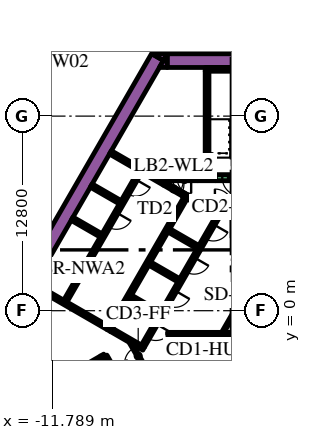
"""IFC4 building model, lengths in metres.
Left out: names, types, materials, properties, quantities, classifications, styles, units other than length and angle.
Written with IfcOpenShell. Run it as: python <this file> out.ifc"""

import sys

from ifc_helpers import new_model, si_unit, direction, frame, frame_2d, origin, place, context, subcontext, project, spatial, polyline, rectangle, outline, extrude, element, fill, save


model = new_model("IFC4")
c1 = context("Model", 3, precision=1e-05, world=origin(), true_north=direction((0.0, 1.0)))
c2 = subcontext(c1, "Body", "Model", "MODEL_VIEW")
j1 = project(units=[si_unit("LENGTHUNIT", "METRE"), si_unit("PLANEANGLEUNIT", "RADIAN")], contexts=[c1])
p1 = place(None, origin())
s1 = spatial("IfcSite", under=j1, at=p1, CompositionType="ELEMENT")
p2 = place(p1, origin())
s2 = spatial("IfcBuilding", under=s1, at=p2, CompositionType="ELEMENT")
p3 = place(p2, frame((0.0, 0.0, 21.6)))
s3 = spatial("IfcBuildingStorey", under=s2, at=p3, CompositionType="ELEMENT", Elevation=21.6)
p4 = place(p3, frame((-15.36, -1.503, 0.0), z_axis=(0.0, 0.0, 1.0), x_axis=(0.50000389221, 0.866023156604, 0.0)))
e1 = element("IfcWall", 1, at=p4, inside=s3, PredefinedType="SOLIDWALL", context=c2, shape_type="SweptSolid", body=[
    extrude(rectangle(XDim=21.0, YDim=0.9, at=frame_2d((10.5, 0.0))), origin(), (0.0, 0.0, 1.0), 6.0),
])
p5 = place(p3, origin())
e2 = element("IfcWall", 2, at=p5, inside=s3, PredefinedType="SOLIDWALL", context=c2, shape_type="SweptSolid", body=[
    extrude(outline(polyline([(-4.215, 16.9), (-4.469, 16.46), (-5.231, 16.9), (-4.215, 16.9)])), origin(), (0.0, 0.0, 1.0), 6.0),
])
p6 = place(p3, frame((-4.224, 16.45, 0.0), z_axis=(0.0, 0.0, 1.0), x_axis=(1.0, 0.0, 0.0)))
e3 = element("IfcWall", 3, at=p6, inside=s3, PredefinedType="SOLIDWALL", context=c2, shape_type="SweptSolid", body=[
    extrude(rectangle(XDim=9.488, YDim=0.9, at=frame_2d((4.744, 0.0))), origin(), (0.0, 0.0, 1.0), 6.0),
])
e4 = element("IfcWall", 4, at=p5, inside=s3, PredefinedType="SOLIDWALL", context=c2, shape_type="SweptSolid", body=[
    extrude(outline(polyline([(-4.734, 16.0), (-4.226, 16.88), (-4.226, 16.0), (-4.734, 16.0)])), origin(), (0.0, 0.0, 1.0), 6.0),
])
p7 = place(p3, frame((-1.725, 15.875, 0.0), z_axis=(0.0, 0.0, 1.0), x_axis=(1.0, 0.0, 0.0)))
e5 = element("IfcWall", 5, at=p7, inside=s3, PredefinedType="SOLIDWALL", context=c2, shape_type="SweptSolid", body=[
    extrude(rectangle(XDim=3.45, YDim=0.25, at=frame_2d((1.725, 0.0))), origin(), (0.0, 0.0, 1.0), 6.0),
])
p8 = place(p3, frame((-1.6, 8.7, 0.0), z_axis=(0.0, 0.0, 1.0), x_axis=(0.0, 1.0, 0.0)))
e6 = element("IfcWall", 6, at=p8, inside=s3, PredefinedType="SOLIDWALL", context=c2, shape_type="SweptSolid", body=[
    extrude(rectangle(XDim=7.05, YDim=0.25, at=frame_2d((3.525, 0.0))), origin(), (0.0, 0.0, 1.0), 6.0),
])
p9 = place(p3, frame((-1.475, 8.825, 0.0), z_axis=(0.0, 0.0, 1.0), x_axis=(1.0, 0.0, 0.0)))
e7 = element("IfcWall", 7, at=p9, inside=s3, PredefinedType="SOLIDWALL", context=c2, shape_type="SweptSolid", body=[
    extrude(rectangle(XDim=0.425, YDim=0.25, at=frame_2d((0.212, 0.0))), origin(), (0.0, 0.0, 1.0), 6.0),
])
p10 = place(p3, frame((-14.44, -6.49, 0.0), z_axis=(0.0, 0.0, 1.0), x_axis=(0.866022966069, 0.500004222222, 0.0)))
e8 = element("IfcWall", 8, at=p10, inside=s3, PredefinedType="SOLIDWALL", context=c2, shape_type="SweptSolid", body=[
    extrude(rectangle(XDim=6.8, YDim=0.25, at=frame_2d((3.4, 0.0))), origin(), (0.0, 0.0, 1.0), 6.0),
])
p11 = place(p3, frame((-8.168, -3.503, 0.0), z_axis=(0.0, 0.0, 1.0), x_axis=(-0.499952099219, 0.866053057547, 0.0)))
e9 = element("IfcWall", 9, at=p11, inside=s3, PredefinedType="SOLIDWALL", context=c2, shape_type="SweptSolid", body=[
    extrude(rectangle(XDim=0.675, YDim=0.25, at=frame_2d((0.337, 0.0))), origin(), (0.0, 0.0, 1.0), 6.0),
])
p12 = place(p3, frame((-8.06, -1.311, 0.0), z_axis=(0.0, 0.0, 1.0), x_axis=(0.50000273126, 0.866023826885, 0.0)))
e10 = element("IfcWall", 10, at=p12, inside=s3, PredefinedType="SOLIDWALL", context=c2, shape_type="SweptSolid", body=[
    extrude(rectangle(XDim=10.33, YDim=0.25, at=frame_2d((5.165, 0.0))), origin(), (0.0, 0.0, 1.0), 6.0),
])
p13 = place(p3, frame((-1.758, 6.835, 0.0), z_axis=(0.0, 0.0, 1.0), x_axis=(0.865982457891, -0.500074377092, 0.0)))
e11 = element("IfcWall", 11, at=p13, inside=s3, PredefinedType="SOLIDWALL", context=c2, shape_type="SweptSolid", body=[
    extrude(rectangle(XDim=0.2, YDim=0.25, at=frame_2d((0.1, 0.0))), origin(), (0.0, 0.0, 1.0), 6.0),
])
p14 = place(p3, frame((-1.76, 6.836, 0.0), z_axis=(0.0, 0.0, 1.0), x_axis=(-0.865952863304, 0.500125622755, 0.0)))
e12 = element("IfcWall", 12, at=p14, inside=s3, PredefinedType="SOLIDWALL", context=c2, shape_type="SweptSolid", body=[
    extrude(rectangle(XDim=1.258, YDim=0.25, at=frame_2d((0.629, 0.0))), origin(), (0.0, 0.0, 1.0), 6.0),
])
p15 = place(p3, frame((-0.728, 6.24, 0.0), z_axis=(0.0, 0.0, 1.0), x_axis=(-0.865955664968, 0.500120771724, 0.0)))
e13 = element("IfcWall", 13, at=p15, inside=s3, PredefinedType="SOLIDWALL", context=c2, shape_type="SweptSolid", body=[
    extrude(rectangle(XDim=0.778, YDim=0.25, at=frame_2d((0.389, 0.0))), origin(), (0.0, 0.0, 1.0), 6.0),
])
for number, where, z_axis, x_axis in (
    (14, (-2.204, 4.182, 0.0), (0.0, 0.0, 1.0), (-0.866, 0.5, 0.0)),
    (15, (-5.369, 3.1, 0.0), (0.0, 0.0, 1.0), (0.866, -0.5, 0.0)),
    (16, (-4.724, -0.182, 0.0), (0.0, 0.0, 1.0), (-0.866, 0.5, 0.0)),
):
    element("IfcWall", number, at=place(p3, frame(where, z_axis=z_axis, x_axis=x_axis)), inside=s3, PredefinedType="SOLIDWALL", context=c2, shape_type="SweptSolid", body=[
        extrude(rectangle(XDim=2.2, YDim=0.25, at=frame_2d((1.1, 0.0))), origin(), (0.0, 0.0, 1.0), 6.0),
    ])
e17 = element("IfcWall", 17, at=p5, inside=s3, PredefinedType="SOLIDWALL", context=c2, shape_type="SweptSolid", body=[
    extrude(outline(polyline([(-5.922, -2.257), (-5.922, -2.257), (-5.705, -2.382), (-5.83, -2.598), (-6.483, -2.221), (-6.591, -2.033), (-6.591, -2.033), (-6.7, -2.096), (-7.952, -1.373), (-7.827, -1.156), (-5.922, -2.257)])), origin(), (0.0, 0.0, 1.0), 6.0),
])
p16 = place(p3, frame((-8.106, -1.14, 0.0), z_axis=(0.0, 0.0, 1.0), x_axis=(-0.866000643155, 0.500042884217, 0.0)))
e18 = element("IfcWall", 18, at=p16, inside=s3, PredefinedType="SOLIDWALL", context=c2, shape_type="SweptSolid", body=[
    extrude(rectangle(XDim=5.65, YDim=0.25, at=frame_2d((2.825, 0.0))), origin(), (0.0, 0.0, 1.0), 6.0),
])
e19 = element("IfcWall", 19, at=p5, inside=s3, PredefinedType="SOLIDWALL", context=c2, shape_type="SweptSolid", body=[
    extrude(outline(polyline([(-3.128, 7.481), (-3.259, 7.557), (-3.134, 7.773), (-3.003, 7.698), (-3.128, 7.481)])), origin(), (0.0, 0.0, 1.0), 6.0),
])
for number, where, z_axis, x_axis in (
    (20, (-8.574, 4.95, 0.0), (0.0, 0.0, 1.0), (-0.866, 0.5, 0.0)),
    (21, (-7.314, 7.132, 0.0), (0.0, 0.0, 1.0), (-0.866, 0.5, 0.0)),
):
    element("IfcWall", number, at=place(p3, frame(where, z_axis=z_axis, x_axis=x_axis)), inside=s3, PredefinedType="SOLIDWALL", context=c2, shape_type="SweptSolid", body=[
        extrude(rectangle(XDim=2.2, YDim=0.25, at=frame_2d((1.1, 0.0))), origin(), (0.0, 0.0, 1.0), 6.0),
    ])
p17 = place(p3, frame((-7.959, 10.415, 0.0), z_axis=(0.0, 0.0, 1.0), x_axis=(0.866020958405, -0.500007699544, 0.0)))
e22 = element("IfcWall", 22, at=p17, inside=s3, PredefinedType="SOLIDWALL", context=c2, shape_type="SweptSolid", body=[
    extrude(rectangle(XDim=4.1, YDim=0.25, at=frame_2d((2.05, 0.0))), origin(), (0.0, 0.0, 1.0), 6.0),
])
p18 = place(p3, frame((-8.252, -2.958, 0.0), z_axis=(0.0, 0.0, 1.0), x_axis=(0.500174715838, -0.865924508047, 0.0)))
e23 = element("IfcWall", 23, at=p18, inside=s3, PredefinedType="PARTITIONING", context=c2, shape_type="SweptSolid", body=[
    extrude(rectangle(XDim=0.514, YDim=0.15, at=frame_2d((0.257, 0.0))), origin(), (0.0, 0.0, 1.0), 4.85),
])
p19 = place(p3, frame((-3.997, 8.625, 0.0), z_axis=(0.0, 0.0, 1.0), x_axis=(-1.0, 0.0, 0.0)))
e24 = element("IfcWall", 24, at=p19, inside=s3, PredefinedType="PARTITIONING", context=c2, shape_type="SweptSolid", body=[
    extrude(rectangle(XDim=0.502, YDim=0.15, at=frame_2d((0.251, 0.0))), origin(), (0.0, 0.0, 1.0), 4.85),
])
p20 = place(p3, frame((-2.196, 8.625, 0.0), z_axis=(0.0, 0.0, 1.0), x_axis=(1.0, 0.0, 0.0)))
e25 = element("IfcWall", 25, at=p20, inside=s3, PredefinedType="PARTITIONING", context=c2, shape_type="SweptSolid", body=[
    extrude(rectangle(XDim=1.146, YDim=0.15, at=frame_2d((0.573, 0.0))), origin(), (0.0, 0.0, 1.0), 4.85),
])
p21 = place(p3, frame((-4.2, -1.5, 0.0), z_axis=(0.0, 0.0, 1.0), x_axis=(1.0, 0.0, 0.0)))
e26 = element("IfcWall", 26, at=p21, inside=s3, PredefinedType="PARTITIONING", context=c2, shape_type="SweptSolid", body=[
    extrude(rectangle(XDim=9.359, YDim=0.15, at=frame_2d((4.68, 0.0))), origin(), (0.0, 0.0, 1.0), 4.85),
])
p22 = place(p3, frame((-0.544, -1.393, 0.0), z_axis=(0.0, 0.0, 1.0), x_axis=(0.499928740635, 0.866066541489, 0.0)))
e27 = element("IfcWall", 27, at=p22, inside=s3, PredefinedType="PARTITIONING", context=c2, shape_type="SweptSolid", body=[
    extrude(rectangle(XDim=1.912, YDim=0.15, at=frame_2d((0.956, 0.0))), origin(), (0.0, 0.0, 1.0), 4.85),
])
p23 = place(p3, frame((-6.008, 9.144, 0.0), z_axis=(0.0, 0.0, 1.0), x_axis=(-0.500006956611, -0.866021387346, 0.0)))
e28 = element("IfcWall", 28, at=p23, inside=s3, PredefinedType="SOLIDWALL", context=c2, shape_type="SweptSolid", body=[
    extrude(rectangle(XDim=9.83, YDim=0.25, at=frame_2d((4.915, 0.0))), origin(), (0.0, 0.0, 1.0), 6.0),
])
p24 = place(p23, frame((0.585, 0.0, 0.0)))
e29 = element("IfcOpeningElement", 29, at=p24, cuts=e28, PredefinedType="OPENING", context=c2, shape_type="SweptSolid", body=[
    extrude(rectangle(XDim=1.1, YDim=2.1, at=frame_2d((0.55, 1.05))), frame((0.0, 0.135, 0.0), z_axis=(0.0, -1.0, 0.0), x_axis=(1.0, 0.0, 0.0)), (0.0, 0.0, 1.0), 0.27),
])
p25 = place(p23, frame((3.105, 0.0, 0.0)))
e30 = element("IfcOpeningElement", 30, at=p25, cuts=e28, PredefinedType="OPENING", context=c2, shape_type="SweptSolid", body=[
    extrude(rectangle(XDim=1.1, YDim=2.1, at=frame_2d((0.55, 1.05))), frame((0.0, 0.135, 0.0), z_axis=(0.0, -1.0, 0.0), x_axis=(1.0, 0.0, 0.0)), (0.0, 0.0, 1.0), 0.27),
])
p26 = place(p23, frame((6.985, 0.0, 0.0)))
e31 = element("IfcOpeningElement", 31, at=p26, cuts=e28, PredefinedType="OPENING", context=c2, shape_type="SweptSolid", body=[
    extrude(rectangle(XDim=0.9, YDim=2.1, at=frame_2d((0.45, 1.05))), frame((0.0, 0.135, 0.0), z_axis=(0.0, -1.0, 0.0), x_axis=(1.0, 0.0, 0.0)), (0.0, 0.0, 1.0), 0.27),
])
p27 = place(p3, frame((-0.898, 6.194, 0.0), z_axis=(0.0, 0.0, 1.0), x_axis=(-0.499996202215, -0.866027596426, 0.0)))
e32 = element("IfcWall", 32, at=p27, inside=s3, PredefinedType="SOLIDWALL", context=c2, shape_type="SweptSolid", body=[
    extrude(rectangle(XDim=9.83, YDim=0.25, at=frame_2d((4.915, 0.0))), origin(), (0.0, 0.0, 1.0), 6.0),
])
p28 = place(p27, frame((0.585, 0.0, 0.0)))
e33 = element("IfcOpeningElement", 33, at=p28, cuts=e32, PredefinedType="OPENING", context=c2, shape_type="SweptSolid", body=[
    extrude(rectangle(XDim=1.1, YDim=2.1, at=frame_2d((0.55, 1.05))), frame((0.0, 0.135, 0.0), z_axis=(0.0, -1.0, 0.0), x_axis=(1.0, 0.0, 0.0)), (0.0, 0.0, 1.0), 0.27),
])
p29 = place(p27, frame((3.105, 0.0, 0.0)))
e34 = element("IfcOpeningElement", 34, at=p29, cuts=e32, PredefinedType="OPENING", context=c2, shape_type="SweptSolid", body=[
    extrude(rectangle(XDim=1.1, YDim=2.1, at=frame_2d((0.55, 1.05))), frame((0.0, 0.135, 0.0), z_axis=(0.0, -1.0, 0.0), x_axis=(1.0, 0.0, 0.0)), (0.0, 0.0, 1.0), 0.27),
])
p30 = place(p27, frame((5.625, 0.0, 0.0)))
e35 = element("IfcOpeningElement", 35, at=p30, cuts=e32, PredefinedType="OPENING", context=c2, shape_type="SweptSolid", body=[
    extrude(rectangle(XDim=1.1, YDim=2.1, at=frame_2d((0.55, 1.05))), frame((0.0, 0.135, 0.0), z_axis=(0.0, -1.0, 0.0), x_axis=(1.0, 0.0, 0.0)), (0.0, 0.0, 1.0), 0.27),
])
p31 = place(p27, frame((8.145, 0.0, 0.0)))
e36 = element("IfcOpeningElement", 36, at=p31, cuts=e32, PredefinedType="OPENING", context=c2, shape_type="SweptSolid", body=[
    extrude(rectangle(XDim=1.1, YDim=2.1, at=frame_2d((0.55, 1.05))), frame((0.0, 0.135, 0.0), z_axis=(0.0, -1.0, 0.0), x_axis=(1.0, 0.0, 0.0)), (0.0, 0.0, 1.0), 0.27),
])
p32 = place(p3, frame((1.05, 8.75, 0.0), z_axis=(0.0, 0.0, 1.0), x_axis=(-1.0, 0.0, 0.0)))
e37 = element("IfcWall", 37, at=p32, inside=s3, PredefinedType="SOLIDWALL", context=c2, shape_type="SweptSolid", body=[
    extrude(rectangle(XDim=2.1, YDim=0.4, at=frame_2d((1.05, 0.0))), origin(), (0.0, 0.0, 1.0), 6.0),
])
p33 = place(p32, frame((0.45, 0.0, 0.0)))
e38 = element("IfcOpeningElement", 38, at=p33, cuts=e37, PredefinedType="OPENING", context=c2, shape_type="SweptSolid", body=[
    extrude(rectangle(XDim=1.2, YDim=2.1, at=frame_2d((0.6, 1.05))), frame((0.0, 0.21, 0.0), z_axis=(0.0, -1.0, 0.0), x_axis=(1.0, 0.0, 0.0)), (0.0, 0.0, 1.0), 0.42),
])
p34 = place(p3, frame((-2.196, 8.625, 0.0), z_axis=(0.0, 0.0, 1.0), x_axis=(-1.0, 0.0, 0.0)))
e39 = element("IfcWall", 39, at=p34, inside=s3, PredefinedType="PARTITIONING", context=c2, shape_type="SweptSolid", body=[
    extrude(rectangle(XDim=1.8, YDim=0.15, at=frame_2d((0.9, 0.0))), origin(), (0.0, 0.0, 1.0), 4.85),
])
p35 = place(p34, frame((0.45, 0.0, 0.0)))
e40 = element("IfcOpeningElement", 40, at=p35, cuts=e39, PredefinedType="OPENING", context=c2, shape_type="SweptSolid", body=[
    extrude(rectangle(XDim=0.9, YDim=2.1, at=frame_2d((0.45, 1.05))), frame((0.0, 0.085, 0.0), z_axis=(0.0, -1.0, 0.0), x_axis=(1.0, 0.0, 0.0)), (0.0, 0.0, 1.0), 0.17),
])
p36 = place(p3, frame((-1.76, -3.498, 0.0), z_axis=(0.0, 0.0, 1.0), x_axis=(0.499977374825, 0.866038466041, 0.0)))
e41 = element("IfcWall", 41, at=p36, inside=s3, PredefinedType="PARTITIONING", context=c2, shape_type="SweptSolid", body=[
    extrude(rectangle(XDim=2.1, YDim=0.15, at=frame_2d((1.05, 0.0))), origin(), (0.0, 0.0, 1.0), 4.85),
])
p37 = place(p36, frame((0.6, 0.0, 0.0)))
e42 = element("IfcOpeningElement", 42, at=p37, cuts=e41, PredefinedType="OPENING", context=c2, shape_type="SweptSolid", body=[
    extrude(rectangle(XDim=0.9, YDim=2.1, at=frame_2d((0.45, 1.05))), frame((0.0, 0.085, 0.0), z_axis=(0.0, -1.0, 0.0), x_axis=(1.0, 0.0, 0.0)), (0.0, 0.0, 1.0), 0.17),
])
p38 = place(p3, frame((-1.534, 6.8, 0.0), z_axis=(0.0, 0.0, 1.0), x_axis=(1.0, 0.0, 0.0)))
e43 = element("IfcWall", 43, at=p38, inside=s3, PredefinedType="PARTITIONING", context=c2, shape_type="SweptSolid", body=[
    extrude(rectangle(XDim=2.1, YDim=0.15, at=frame_2d((1.05, 0.0))), origin(), (0.0, 0.0, 1.0), 4.85),
])
p39 = place(p38, frame((0.45, 0.0, 0.0)))
e44 = element("IfcOpeningElement", 44, at=p39, cuts=e43, PredefinedType="OPENING", context=c2, shape_type="SweptSolid", body=[
    extrude(rectangle(XDim=1.2, YDim=2.1, at=frame_2d((0.6, 1.05))), frame((0.0, 0.085, 0.0), z_axis=(0.0, -1.0, 0.0), x_axis=(1.0, 0.0, 0.0)), (0.0, 0.0, 1.0), 0.17),
])
p40 = place(p3, frame((-5.606, -3.89, 0.0), z_axis=(0.0, 0.0, 1.0), x_axis=(-0.500027713859, 0.866009402589, 0.0)))
e45 = element("IfcWall", 45, at=p40, inside=s3, PredefinedType="PARTITIONING", context=c2, shape_type="SweptSolid", body=[
    extrude(rectangle(XDim=2.1, YDim=0.15, at=frame_2d((1.05, 0.0))), origin(), (0.0, 0.0, 1.0), 4.85),
])
p41 = place(p40, frame((0.45, 0.0, 0.0)))
e46 = element("IfcOpeningElement", 46, at=p41, cuts=e45, PredefinedType="OPENING", context=c2, shape_type="SweptSolid", body=[
    extrude(rectangle(XDim=1.2, YDim=2.1, at=frame_2d((0.6, 1.05))), frame((0.0, 0.085, 0.0), z_axis=(0.0, -1.0, 0.0), x_axis=(1.0, 0.0, 0.0)), (0.0, 0.0, 1.0), 0.17),
])
p42 = place(p3, frame((-4.409, 8.365, 0.0), z_axis=(0.0, 0.0, 1.0), x_axis=(0.866034573852, -0.49998411664, 0.0)))
e47 = element("IfcWall", 47, at=p42, inside=s3, PredefinedType="SOLIDWALL", context=c2, shape_type="SweptSolid", body=[
    extrude(rectangle(XDim=1.4, YDim=0.25, at=frame_2d((0.7, 0.0))), origin(), (0.0, 0.0, 1.0), 6.0),
])
p43 = place(p42, frame((0.1, 0.0, 0.0)))
e48 = element("IfcOpeningElement", 48, at=p43, cuts=e47, PredefinedType="OPENING", context=c2, shape_type="SweptSolid", body=[
    extrude(rectangle(XDim=1.2, YDim=2.1, at=frame_2d((0.6, 1.05))), frame((0.0, 0.135, 0.0), z_axis=(0.0, -1.0, 0.0), x_axis=(1.0, 0.0, 0.0)), (0.0, 0.0, 1.0), 0.27),
])
p44 = place(p3, frame((-6.875, 40.198, 0.0), z_axis=(0.0, 0.0, 1.0), x_axis=(-0.500000527961, -0.866025098966, 0.0)))
e49 = element("IfcWall", 49, at=p44, inside=s3, PredefinedType="SOLIDWALL", context=c2, shape_type="SweptSolid", body=[
    extrude(rectangle(XDim=62.75, YDim=0.25, at=frame_2d((31.375, 0.0))), origin(), (0.0, 0.0, 1.0), 4.5),
])
p45 = place(p24, origin())
e50 = element("IfcDoor", 50, at=p45, inside=s3, OperationType="DOUBLE_DOOR_SLIDING", PredefinedType="DOOR", context=c2, shape_type="SweptSolid", body=[
    extrude(rectangle(XDim=1.1, YDim=2.1, at=frame_2d((0.55, 1.05))), frame((0.0, 0.025, 0.0), z_axis=(0.0, -1.0, 0.0), x_axis=(1.0, 0.0, 0.0)), (0.0, 0.0, 1.0), 0.05),
])
fill(e29, e50)
p46 = place(p25, origin())
e51 = element("IfcDoor", 51, at=p46, inside=s3, OperationType="DOUBLE_DOOR_SLIDING", PredefinedType="DOOR", context=c2, shape_type="SweptSolid", body=[
    extrude(rectangle(XDim=1.1, YDim=2.1, at=frame_2d((0.55, 1.05))), frame((0.0, 0.025, 0.0), z_axis=(0.0, -1.0, 0.0), x_axis=(1.0, 0.0, 0.0)), (0.0, 0.0, 1.0), 0.05),
])
fill(e30, e51)
p47 = place(p26, origin())
e52 = element("IfcDoor", 52, at=p47, inside=s3, OperationType="SINGLE_SWING_LEFT", PredefinedType="DOOR", context=c2, shape_type="SweptSolid", body=[
    extrude(rectangle(XDim=0.9, YDim=2.1, at=frame_2d((0.45, 1.05))), frame((0.0, 0.025, 0.0), z_axis=(0.0, -1.0, 0.0), x_axis=(1.0, 0.0, 0.0)), (0.0, 0.0, 1.0), 0.05),
])
fill(e31, e52)
p48 = place(p28, origin())
e53 = element("IfcDoor", 53, at=p48, inside=s3, OperationType="DOUBLE_DOOR_SLIDING", PredefinedType="DOOR", context=c2, shape_type="SweptSolid", body=[
    extrude(rectangle(XDim=1.1, YDim=2.1, at=frame_2d((0.55, 1.05))), frame((0.0, 0.025, 0.0), z_axis=(0.0, -1.0, 0.0), x_axis=(1.0, 0.0, 0.0)), (0.0, 0.0, 1.0), 0.05),
])
fill(e33, e53)
p49 = place(p29, origin())
e54 = element("IfcDoor", 54, at=p49, inside=s3, OperationType="DOUBLE_DOOR_SLIDING", PredefinedType="DOOR", context=c2, shape_type="SweptSolid", body=[
    extrude(rectangle(XDim=1.1, YDim=2.1, at=frame_2d((0.55, 1.05))), frame((0.0, 0.025, 0.0), z_axis=(0.0, -1.0, 0.0), x_axis=(1.0, 0.0, 0.0)), (0.0, 0.0, 1.0), 0.05),
])
fill(e34, e54)
p50 = place(p30, origin())
e55 = element("IfcDoor", 55, at=p50, inside=s3, OperationType="DOUBLE_DOOR_SLIDING", PredefinedType="DOOR", context=c2, shape_type="SweptSolid", body=[
    extrude(rectangle(XDim=1.1, YDim=2.1, at=frame_2d((0.55, 1.05))), frame((0.0, 0.025, 0.0), z_axis=(0.0, -1.0, 0.0), x_axis=(1.0, 0.0, 0.0)), (0.0, 0.0, 1.0), 0.05),
])
fill(e35, e55)
p51 = place(p31, origin())
e56 = element("IfcDoor", 56, at=p51, inside=s3, OperationType="DOUBLE_DOOR_SLIDING", PredefinedType="DOOR", context=c2, shape_type="SweptSolid", body=[
    extrude(rectangle(XDim=1.1, YDim=2.1, at=frame_2d((0.55, 1.05))), frame((0.0, 0.025, 0.0), z_axis=(0.0, -1.0, 0.0), x_axis=(1.0, 0.0, 0.0)), (0.0, 0.0, 1.0), 0.05),
])
fill(e36, e56)
p52 = place(p33, origin())
e57 = element("IfcDoor", 57, at=p52, inside=s3, OperationType="SINGLE_SWING_LEFT", PredefinedType="DOOR", context=c2, shape_type="SweptSolid", body=[
    extrude(rectangle(XDim=1.2, YDim=2.1, at=frame_2d((0.6, 1.05))), frame((0.0, 0.025, 0.0), z_axis=(0.0, -1.0, 0.0), x_axis=(1.0, 0.0, 0.0)), (0.0, 0.0, 1.0), 0.05),
])
fill(e38, e57)
p53 = place(p35, origin())
e58 = element("IfcDoor", 58, at=p53, inside=s3, OperationType="SINGLE_SWING_LEFT", PredefinedType="DOOR", context=c2, shape_type="SweptSolid", body=[
    extrude(rectangle(XDim=0.9, YDim=2.1, at=frame_2d((0.45, 1.05))), frame((0.0, 0.025, 0.0), z_axis=(0.0, -1.0, 0.0), x_axis=(1.0, 0.0, 0.0)), (0.0, 0.0, 1.0), 0.05),
])
fill(e40, e58)
p54 = place(p37, origin())
e59 = element("IfcDoor", 59, at=p54, inside=s3, OperationType="SINGLE_SWING_LEFT", PredefinedType="DOOR", context=c2, shape_type="SweptSolid", body=[
    extrude(rectangle(XDim=0.9, YDim=2.1, at=frame_2d((0.45, 1.05))), frame((0.0, 0.025, 0.0), z_axis=(0.0, -1.0, 0.0), x_axis=(1.0, 0.0, 0.0)), (0.0, 0.0, 1.0), 0.05),
])
fill(e42, e59)
p55 = place(p39, origin())
e60 = element("IfcDoor", 60, at=p55, inside=s3, OperationType="SINGLE_SWING_LEFT", PredefinedType="DOOR", context=c2, shape_type="SweptSolid", body=[
    extrude(rectangle(XDim=1.2, YDim=2.1, at=frame_2d((0.6, 1.05))), frame((0.0, 0.025, 0.0), z_axis=(0.0, -1.0, 0.0), x_axis=(1.0, 0.0, 0.0)), (0.0, 0.0, 1.0), 0.05),
])
fill(e44, e60)
p56 = place(p41, origin())
e61 = element("IfcDoor", 61, at=p56, inside=s3, OperationType="SINGLE_SWING_LEFT", PredefinedType="DOOR", context=c2, shape_type="SweptSolid", body=[
    extrude(rectangle(XDim=1.2, YDim=2.1, at=frame_2d((0.6, 1.05))), frame((0.0, 0.025, 0.0), z_axis=(0.0, -1.0, 0.0), x_axis=(1.0, 0.0, 0.0)), (0.0, 0.0, 1.0), 0.05),
])
fill(e46, e61)
p57 = place(p43, origin())
e62 = element("IfcDoor", 62, at=p57, inside=s3, OperationType="SINGLE_SWING_LEFT", PredefinedType="DOOR", context=c2, shape_type="SweptSolid", body=[
    extrude(rectangle(XDim=1.2, YDim=2.1, at=frame_2d((0.6, 1.05))), frame((0.0, 0.025, 0.0), z_axis=(0.0, -1.0, 0.0), x_axis=(1.0, 0.0, 0.0)), (0.0, 0.0, 1.0), 0.05),
])
fill(e48, e62)
save(model, sys.argv[1])
